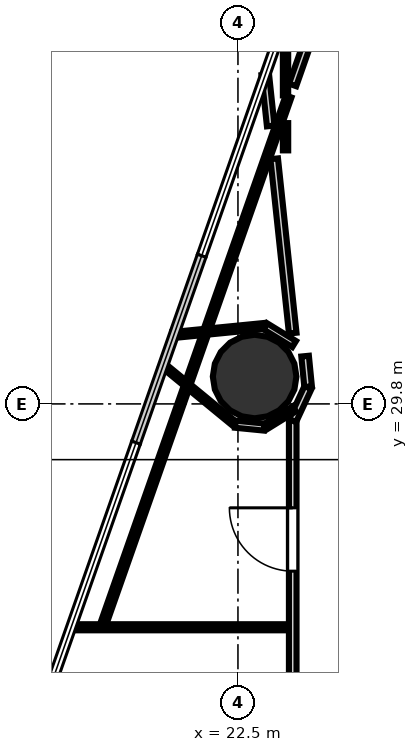
"""IFC4 building model, lengths in metres.
Left out: names, types, materials, properties, quantities, classifications, styles, units other than length and angle.
Written with IfcOpenShell. Run it as: python <this file> out.ifc"""

import sys

from ifc_helpers import new_model, si_unit, direction, frame, frame_2d, origin, origin_2d, place, context, subcontext, project, spatial, rectangle, hollow_circle, extrude, element, fill, save


model = new_model("IFC4")
c1 = context("Model", 3, precision=1e-05, world=origin(), true_north=direction((0.0, 1.0)))
c2 = subcontext(c1, "Body", "Model", "MODEL_VIEW")
j1 = project(units=[si_unit("LENGTHUNIT", "METRE"), si_unit("PLANEANGLEUNIT", "RADIAN")], contexts=[c1])
p1 = place(None, origin())
s1 = spatial("IfcSite", under=j1, at=p1, CompositionType="ELEMENT")
p2 = place(p1, origin())
s2 = spatial("IfcBuilding", under=s1, at=p2, CompositionType="ELEMENT")
p3 = place(p2, frame((0.0, 0.0, 63.6)))
s3 = spatial("IfcBuildingStorey", under=s2, at=p3, CompositionType="ELEMENT", Elevation=63.6)
p4 = place(p3, frame((22.829, 30.34, 0.0), z_axis=(0.0, 0.0, 1.0), x_axis=(1.0, 0.0, 0.0)))
e1 = element("IfcColumn", 1, at=p4, inside=s3, PredefinedType="COLUMN", context=c2, shape_type="SweptSolid", body=[
    extrude(hollow_circle(Radius=0.825, WallThickness=0.04, at=origin_2d()), origin(), (0.0, 0.0, 1.0), 3.7),
])
p5 = place(p3, frame((23.581, 31.197, 0.0), z_axis=(0.0, 0.0, 1.0), x_axis=(-0.105728143811, 0.994395072195, 0.0)))
e2 = element("IfcWall", 2, at=p5, inside=s3, PredefinedType="PARTITIONING", context=c2, shape_type="SweptSolid", body=[
    extrude(rectangle(XDim=3.459, YDim=0.15, at=frame_2d((1.729, 0.0))), origin(), (0.0, 0.0, 1.0), 2.798),
])
p6 = place(p3, frame((23.579, 36.094, 0.0), z_axis=(0.0, 0.0, 1.0), x_axis=(0.331492162661, 0.943457972617, 0.0)))
e3 = element("IfcWall", 3, at=p6, inside=s3, PredefinedType="PARTITIONING", context=c2, shape_type="SweptSolid", body=[
    extrude(rectangle(XDim=2.857, YDim=0.15, at=frame_2d((1.428, 0.0))), origin(), (0.0, 0.0, 1.0), 2.84),
])
p7 = place(p3, frame((23.581, 18.15, 0.0), z_axis=(0.0, 0.0, 1.0), x_axis=(0.0, 1.0, 0.0)))
e4 = element("IfcWall", 4, at=p7, inside=s3, PredefinedType="PARTITIONING", context=c2, shape_type="SweptSolid", body=[
    extrude(rectangle(XDim=11.333, YDim=0.15, at=frame_2d((5.667, 0.0))), origin(), (0.0, 0.0, 1.0), 2.798),
])
p8 = place(p7, frame((8.349, 0.0, 0.0)))
e5 = element("IfcOpeningElement", 5, at=p8, cuts=e4, PredefinedType="OPENING", context=c2, shape_type="SweptSolid", body=[
    extrude(rectangle(XDim=1.25, YDim=2.2, at=frame_2d((0.625, 1.1))), frame((0.0, 0.085, 0.0), z_axis=(0.0, -1.0, 0.0), x_axis=(1.0, 0.0, 0.0)), (0.0, 0.0, 1.0), 0.17),
])
p9 = place(p3, frame((23.578, 29.47, 0.0), z_axis=(0.0, 0.0, 1.0), x_axis=(0.421827918194, 0.906675910914, 0.0)))
e6 = element("IfcWall", 6, at=p9, inside=s3, PredefinedType="PARTITIONING", context=c2, shape_type="SweptSolid", body=[
    extrude(rectangle(XDim=0.72, YDim=0.15, at=frame_2d((0.36, 0.0))), origin(), (0.0, 0.0, 1.0), 2.84),
])
p10 = place(p3, frame((23.885, 30.139, 0.0), z_axis=(0.0, 0.0, 1.0), x_axis=(-0.0981888168, 0.995167803064, 0.0)))
e7 = element("IfcWall", 7, at=p10, inside=s3, PredefinedType="PARTITIONING", context=c2, shape_type="SweptSolid", body=[
    extrude(rectangle(XDim=0.607, YDim=0.15, at=frame_2d((0.303, 0.0))), origin(), (0.0, 0.0, 1.0), 2.84),
])
p11 = place(p3, frame((19.188, 25.392, 0.0), z_axis=(0.0, 0.0, 1.0), x_axis=(1.0, 0.0, 0.0)))
e8 = element("IfcWall", 8, at=p11, inside=s3, PredefinedType="PARTITIONING", context=c2, shape_type="SweptSolid", body=[
    extrude(rectangle(XDim=4.282, YDim=0.12, at=frame_2d((2.141, 0.0))), origin(), (0.0, 0.0, 1.0), 2.798),
])
p12 = place(p3, frame((19.855, 25.497, 0.0), z_axis=(0.0, 0.0, 1.0), x_axis=(0.331505765722, 0.943453192953, 0.0)))
e9 = element("IfcWall", 9, at=p12, inside=s3, PredefinedType="PARTITIONING", context=c2, shape_type="SweptSolid", body=[
    extrude(rectangle(XDim=10.992, YDim=0.12, at=frame_2d((5.496, 0.0))), origin(), (0.0, 0.0, 1.0), 2.798),
])
p13 = place(p3, frame((23.439, 37.453, 0.0), z_axis=(0.0, 0.0, 1.0), x_axis=(0.0, -1.0, 0.0)))
e10 = element("IfcWall", 10, at=p13, inside=s3, PredefinedType="PARTITIONING", context=c2, shape_type="SweptSolid", body=[
    extrude(rectangle(XDim=1.565, YDim=0.105, at=frame_2d((0.782, 0.0))), origin(), (0.0, 0.0, 1.0), 2.84),
])
p14 = place(p3, frame((23.608, 30.982, 0.0), z_axis=(0.0, 0.0, 1.0), x_axis=(-0.852045812822, 0.523467222328, 0.0)))
e11 = element("IfcWall", 11, at=p14, inside=s3, PredefinedType="PARTITIONING", context=c2, shape_type="SweptSolid", body=[
    extrude(rectangle(XDim=0.67, YDim=0.14, at=frame_2d((0.335, 0.0))), origin(), (0.0, 0.0, 1.0), 2.798),
])
p15 = place(p3, frame((23.018, 31.337, 0.0), z_axis=(0.0, 0.0, 1.0), x_axis=(-0.995186856908, -0.097995509274, 0.0)))
e12 = element("IfcWall", 12, at=p15, inside=s3, PredefinedType="PARTITIONING", context=c2, shape_type="SweptSolid", body=[
    extrude(rectangle(XDim=1.811, YDim=0.12, at=frame_2d((0.906, 0.0))), origin(), (0.0, 0.0, 1.0), 2.798),
])
p16 = place(p3, frame((21.009, 30.574, 0.0), z_axis=(0.0, 0.0, 1.0), x_axis=(0.772981671656, -0.634428353152, 0.0)))
e13 = element("IfcWall", 13, at=p16, inside=s3, PredefinedType="PARTITIONING", context=c2, shape_type="SweptSolid", body=[
    extrude(rectangle(XDim=1.841, YDim=0.105, at=frame_2d((0.921, 0.0))), origin(), (0.0, 0.0, 1.0), 2.798),
])
p17 = place(p3, frame((22.449, 29.399, 0.0), z_axis=(0.0, 0.0, 1.0), x_axis=(0.995167364461, -0.098193262045, 0.0)))
e14 = element("IfcWall", 14, at=p17, inside=s3, PredefinedType="PARTITIONING", context=c2, shape_type="SweptSolid", body=[
    extrude(rectangle(XDim=0.572, YDim=0.14, at=frame_2d((0.286, 0.0))), origin(), (0.0, 0.0, 1.0), 2.798),
])
p18 = place(p3, frame((23.038, 29.348, 0.0), z_axis=(0.0, 0.0, 1.0), x_axis=(0.850157603054, 0.526528299306, 0.0)))
e15 = element("IfcWall", 15, at=p18, inside=s3, PredefinedType="PARTITIONING", context=c2, shape_type="SweptSolid", body=[
    extrude(rectangle(XDim=0.677, YDim=0.12, at=frame_2d((0.339, 0.0))), origin(), (0.0, 0.0, 1.0), 2.798),
])
p19 = place(p3, frame((23.146, 35.285, 0.0), z_axis=(0.0, 0.0, 1.0), x_axis=(-0.105523084054, 0.994416853604, 0.0)))
e16 = element("IfcWall", 16, at=p19, inside=s3, PredefinedType="PARTITIONING", context=c2, shape_type="SweptSolid", body=[
    extrude(rectangle(XDim=1.016, YDim=0.15, at=frame_2d((0.508, 0.0))), origin(), (0.0, 0.0, 1.0), 2.798),
])
p20 = place(p3, frame((23.439, 35.341, 0.0), z_axis=(0.0, 0.0, 1.0), x_axis=(0.0, -1.0, 0.0)))
e17 = element("IfcWall", 17, at=p20, inside=s3, PredefinedType="PARTITIONING", context=c2, shape_type="SweptSolid", body=[
    extrude(rectangle(XDim=0.538, YDim=0.105, at=frame_2d((0.269, 0.0))), origin(), (0.0, 0.0, 1.0), 2.84),
])
p21 = place(p8, origin())
e18 = element("IfcDoor", 18, at=p21, inside=s3, OperationType="SINGLE_SWING_RIGHT", PredefinedType="DOOR", context=c2, shape_type="SweptSolid", body=[
    extrude(rectangle(XDim=1.25, YDim=2.2, at=frame_2d((0.625, 1.1))), frame((0.0, 0.025, 0.0), z_axis=(0.0, -1.0, 0.0), x_axis=(1.0, 0.0, 0.0)), (0.0, 0.0, 1.0), 0.05),
])
fill(e5, e18)
save(model, sys.argv[1])
